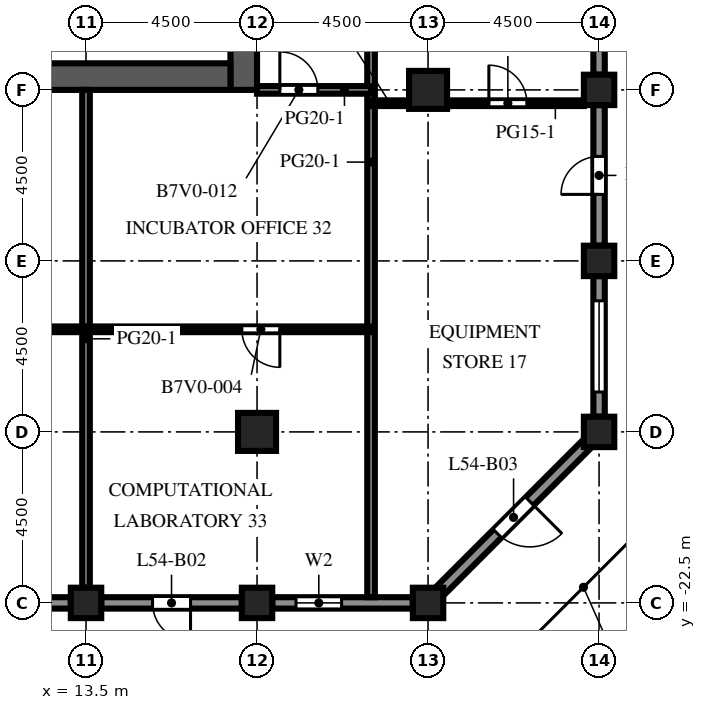
"""IFC4 building model, lengths in metres.
Left out: names, types, materials, properties, quantities, classifications, styles, units other than length and angle.
Written with IfcOpenShell. Run it as: python <this file> out.ifc"""

import sys

from ifc_helpers import new_model, si_unit, direction, frame, frame_2d, origin, origin_2d, place, context, subcontext, project, spatial, rectangle, extrude, element, fill, save


model = new_model("IFC4")
c1 = context("Model", 3, precision=1e-05, world=origin(), true_north=direction((0.0, 1.0)))
c2 = subcontext(c1, "Body", "Model", "MODEL_VIEW")
j1 = project(units=[si_unit("LENGTHUNIT", "METRE"), si_unit("PLANEANGLEUNIT", "RADIAN")], contexts=[c1])
p1 = place(None, origin())
s1 = spatial("IfcSite", under=j1, at=p1, CompositionType="ELEMENT")
p2 = place(p1, origin())
s2 = spatial("IfcBuilding", under=s1, at=p2, CompositionType="ELEMENT")
p3 = place(p2, frame((0.0, 0.0, 239.8)))
s3 = spatial("IfcBuildingStorey", under=s2, at=p3, CompositionType="ELEMENT", Elevation=239.8)
for number, where, z_axis, x_axis in (
    (1, (13.5, -22.5, 0.0), (0.0, 0.0, 1.0), (1.0, 0.0, 0.0)),
    (2, (18.0, -22.5, 0.0), (0.0, 0.0, 1.0), (1.0, 0.0, 0.0)),
    (3, (22.5, -22.5, 0.0), (0.0, 0.0, 1.0), (1.0, 0.0, 0.0)),
    (4, (27.0, -18.0, 0.0), (0.0, 0.0, 1.0), (1.0, 0.0, 0.0)),
    (5, (27.0, -13.5, 0.0), (0.0, 0.0, 1.0), (1.0, 0.0, 0.0)),
    (6, (27.0, -9.0, 0.0), (0.0, 0.0, 1.0), (1.0, 0.0, 0.0)),
):
    element("IfcColumn", number, at=place(p3, frame(where, z_axis=z_axis, x_axis=x_axis)), inside=s3, PredefinedType="COLUMN", context=c2, shape_type="SweptSolid", body=[
        extrude(rectangle(XDim=0.8, YDim=0.8, at=origin_2d()), origin(), (0.0, 0.0, 1.0), 4.1),
    ])
for number, where, z_axis, x_axis in (
    (7, (18.0, -18.0, 0.0), (0.0, 0.0, 1.0), (1.0, 0.0, 0.0)),
    (8, (22.5, -9.0, 0.0), (0.0, 0.0, 1.0), (1.0, 0.0, 0.0)),
):
    element("IfcColumn", number, at=place(p3, frame(where, z_axis=z_axis, x_axis=x_axis)), inside=s3, PredefinedType="COLUMN", context=c2, shape_type="SweptSolid", body=[
        extrude(rectangle(XDim=1.0, YDim=1.0, at=origin_2d()), origin(), (0.0, 0.0, 1.0), 4.1),
    ])
p4 = place(p3, frame((17.65, -9.0, 0.0), z_axis=(0.0, 0.0, 1.0), x_axis=(0.0, 1.0, 0.0)))
e9 = element("IfcWall", 9, at=p4, inside=s3, PredefinedType="SHEAR", context=c2, shape_type="SweptSolid", body=[
    extrude(rectangle(XDim=27.5, YDim=0.7, at=frame_2d((13.75, 0.0))), origin(), (0.0, 0.0, 1.0), 4.1),
])
p5 = place(p4, frame((12.55, 0.0, 0.0)))
e10 = element("IfcOpeningElement", 10, at=p5, cuts=e9, PredefinedType="OPENING", context=c2, shape_type="SweptSolid", body=[
    extrude(rectangle(XDim=2.4, YDim=2.4, at=frame_2d((1.2, 1.2))), frame((0.0, 0.36, 0.0), z_axis=(0.0, -1.0, 0.0), x_axis=(1.0, 0.0, 0.0)), (0.0, 0.0, 1.0), 0.72),
])
p6 = place(p4, frame((6.825, 0.0, 0.0)))
e11 = element("IfcOpeningElement", 11, at=p6, cuts=e9, PredefinedType="OPENING", context=c2, shape_type="SweptSolid", body=[
    extrude(rectangle(XDim=1.2, YDim=2.1, at=frame_2d((0.6, 1.05))), frame((0.0, 0.36, 0.0), z_axis=(0.0, -1.0, 0.0), x_axis=(1.0, 0.0, 0.0)), (0.0, 0.0, 1.0), 0.72),
])
p7 = place(p4, frame((19.475, 0.0, 0.0)))
e12 = element("IfcOpeningElement", 12, at=p7, cuts=e9, PredefinedType="OPENING", context=c2, shape_type="SweptSolid", body=[
    extrude(rectangle(XDim=1.2, YDim=2.1, at=frame_2d((0.6, 1.05))), frame((0.0, 0.36, 0.0), z_axis=(0.0, -1.0, 0.0), x_axis=(1.0, 0.0, 0.0)), (0.0, 0.0, 1.0), 0.72),
])
p8 = place(p3, frame((6.7, -8.65, 0.0), z_axis=(0.0, 0.0, 1.0), x_axis=(1.0, 0.0, 0.0)))
e13 = element("IfcWall", 13, at=p8, inside=s3, PredefinedType="SHEAR", context=c2, shape_type="SweptSolid", body=[
    extrude(rectangle(XDim=10.6, YDim=0.7, at=frame_2d((5.3, 0.0))), origin(), (0.0, 0.0, 1.0), 4.1),
])
p9 = place(p3, frame((13.1, -22.5, 0.0), z_axis=(0.0, 0.0, 1.0), x_axis=(-1.0, 0.0, 0.0)))
e14 = element("IfcWall", 14, at=p9, inside=s3, PredefinedType="SOLIDWALL", context=c2, shape_type="SweptSolid", body=[
    extrude(rectangle(XDim=3.7, YDim=0.3, at=frame_2d((1.85, 0.0))), origin(), (0.0, 0.0, 1.0), 2.85),
])
p10 = place(p9, frame((0.65, 0.0, 0.8)))
e15 = element("IfcOpeningElement", 15, at=p10, cuts=e14, PredefinedType="OPENING", context=c2, shape_type="SweptSolid", body=[
    extrude(rectangle(XDim=2.4, YDim=1.7, at=frame_2d((1.2, 0.85))), frame((0.0, 0.16, 0.0), z_axis=(0.0, -1.0, 0.0), x_axis=(1.0, 0.0, 0.0)), (0.0, 0.0, 1.0), 0.32),
])
p11 = place(p3, frame((17.6, -22.5, 0.0), z_axis=(0.0, 0.0, 1.0), x_axis=(-1.0, 0.0, 0.0)))
e16 = element("IfcWall", 16, at=p11, inside=s3, PredefinedType="SOLIDWALL", context=c2, shape_type="SweptSolid", body=[
    extrude(rectangle(XDim=3.7, YDim=0.3, at=frame_2d((1.85, 0.0))), origin(), (0.0, 0.0, 1.0), 2.85),
])
p12 = place(p11, frame((1.35, 0.0, 0.0)))
e17 = element("IfcOpeningElement", 17, at=p12, cuts=e16, PredefinedType="OPENING", context=c2, shape_type="SweptSolid", body=[
    extrude(rectangle(XDim=1.0, YDim=2.2, at=frame_2d((0.5, 1.1))), frame((0.0, 0.16, 0.0), z_axis=(0.0, -1.0, 0.0), x_axis=(1.0, 0.0, 0.0)), (0.0, 0.0, 1.0), 0.32),
])
p13 = place(p3, frame((22.1, -22.5, 0.0), z_axis=(0.0, 0.0, 1.0), x_axis=(-1.0, 0.0, 0.0)))
e18 = element("IfcWall", 18, at=p13, inside=s3, PredefinedType="SOLIDWALL", context=c2, shape_type="SweptSolid", body=[
    extrude(rectangle(XDim=3.7, YDim=0.3, at=frame_2d((1.85, 0.0))), origin(), (0.0, 0.0, 1.0), 2.85),
])
p14 = place(p13, frame((1.875, 0.0, 0.8)))
e19 = element("IfcOpeningElement", 19, at=p14, cuts=e18, PredefinedType="OPENING", context=c2, shape_type="SweptSolid", body=[
    extrude(rectangle(XDim=1.2, YDim=1.7, at=frame_2d((0.6, 0.85))), frame((0.0, 0.16, 0.0), z_axis=(0.0, -1.0, 0.0), x_axis=(1.0, 0.0, 0.0)), (0.0, 0.0, 1.0), 0.32),
])
p15 = place(p3, frame((26.706, -18.294, 0.0), z_axis=(0.0, 0.0, 1.0), x_axis=(-0.707106781187, -0.707106781187, 0.0)))
e20 = element("IfcWall", 20, at=p15, inside=s3, PredefinedType="SOLIDWALL", context=c2, shape_type="SweptSolid", body=[
    extrude(rectangle(XDim=5.532, YDim=0.3, at=frame_2d((2.766, 0.0))), origin(), (0.0, 0.0, 1.0), 2.85),
])
p16 = place(p15, frame((2.166, 0.0, 0.0)))
e21 = element("IfcOpeningElement", 21, at=p16, cuts=e20, PredefinedType="OPENING", context=c2, shape_type="SweptSolid", body=[
    extrude(rectangle(XDim=1.2, YDim=2.2, at=frame_2d((0.6, 1.1))), frame((0.0, 0.16, 0.0), z_axis=(0.0, -1.0, 0.0), x_axis=(1.0, 0.0, 0.0)), (0.0, 0.0, 1.0), 0.32),
])
p17 = place(p3, frame((27.0, -13.9, 0.0), z_axis=(0.0, 0.0, 1.0), x_axis=(0.0, -1.0, 0.0)))
e22 = element("IfcWall", 22, at=p17, inside=s3, PredefinedType="SOLIDWALL", context=c2, shape_type="SweptSolid", body=[
    extrude(rectangle(XDim=3.7, YDim=0.3, at=frame_2d((1.85, 0.0))), origin(), (0.0, 0.0, 1.0), 2.85),
])
p18 = place(p17, frame((0.65, 0.0, 0.8)))
e23 = element("IfcOpeningElement", 23, at=p18, cuts=e22, PredefinedType="OPENING", context=c2, shape_type="SweptSolid", body=[
    extrude(rectangle(XDim=2.4, YDim=1.7, at=frame_2d((1.2, 0.85))), frame((0.0, 0.16, 0.0), z_axis=(0.0, -1.0, 0.0), x_axis=(1.0, 0.0, 0.0)), (0.0, 0.0, 1.0), 0.32),
])
p19 = place(p3, frame((27.0, -9.4, 0.0), z_axis=(0.0, 0.0, 1.0), x_axis=(0.0, -1.0, 0.0)))
e24 = element("IfcWall", 24, at=p19, inside=s3, PredefinedType="SOLIDWALL", context=c2, shape_type="SweptSolid", body=[
    extrude(rectangle(XDim=3.7, YDim=0.3, at=frame_2d((1.85, 0.0))), origin(), (0.0, 0.0, 1.0), 2.85),
])
p20 = place(p19, frame((1.35, 0.0, 0.0)))
e25 = element("IfcOpeningElement", 25, at=p20, cuts=e24, PredefinedType="OPENING", context=c2, shape_type="SweptSolid", body=[
    extrude(rectangle(XDim=1.0, YDim=2.2, at=frame_2d((0.5, 1.1))), frame((0.0, 0.16, 0.0), z_axis=(0.0, -1.0, 0.0), x_axis=(1.0, 0.0, 0.0)), (0.0, 0.0, 1.0), 0.32),
])
p21 = place(p3, frame((27.0, -4.9, 0.0), z_axis=(0.0, 0.0, 1.0), x_axis=(0.0, -1.0, 0.0)))
e26 = element("IfcWall", 26, at=p21, inside=s3, PredefinedType="SOLIDWALL", context=c2, shape_type="SweptSolid", body=[
    extrude(rectangle(XDim=3.7, YDim=0.3, at=frame_2d((1.85, 0.0))), origin(), (0.0, 0.0, 1.0), 2.85),
])
p22 = place(p21, frame((0.65, 0.0, 0.8)))
e27 = element("IfcOpeningElement", 27, at=p22, cuts=e26, PredefinedType="OPENING", context=c2, shape_type="SweptSolid", body=[
    extrude(rectangle(XDim=2.4, YDim=1.7, at=frame_2d((1.2, 0.85))), frame((0.0, 0.16, 0.0), z_axis=(0.0, -1.0, 0.0), x_axis=(1.0, 0.0, 0.0)), (0.0, 0.0, 1.0), 0.32),
])
p23 = place(p3, frame((13.5, -22.1, 0.0), z_axis=(0.0, 0.0, 1.0), x_axis=(0.0, 1.0, 0.0)))
e28 = element("IfcWall", 28, at=p23, inside=s3, PredefinedType="PARTITIONING", context=c2, shape_type="SweptSolid", body=[
    extrude(rectangle(XDim=13.1, YDim=0.2, at=frame_2d((6.55, 0.0))), origin(), (0.0, 0.0, 1.0), 3.65),
])
p24 = place(p3, frame((21.0, 3.25, 0.0), z_axis=(0.0, 0.0, 1.0), x_axis=(0.0, -1.0, 0.0)))
e29 = element("IfcWall", 29, at=p24, inside=s3, PredefinedType="PARTITIONING", context=c2, shape_type="SweptSolid", body=[
    extrude(rectangle(XDim=25.6, YDim=0.2, at=frame_2d((12.8, 0.0))), origin(), (0.0, 0.0, 1.0), 3.65),
])
p25 = place(p24, frame((1.7, 0.0, 0.0)))
e30 = element("IfcOpeningElement", 30, at=p25, cuts=e29, PredefinedType="OPENING", context=c2, shape_type="SweptSolid", body=[
    extrude(rectangle(XDim=1.0, YDim=2.1, at=frame_2d((0.5, 1.05))), frame((0.0, 0.11, 0.0), z_axis=(0.0, -1.0, 0.0), x_axis=(1.0, 0.0, 0.0)), (0.0, 0.0, 1.0), 0.22),
])
p26 = place(p3, frame((21.0, -15.3, 0.0), z_axis=(0.0, 0.0, 1.0), x_axis=(-1.0, 0.0, 0.0)))
e31 = element("IfcWall", 31, at=p26, inside=s3, PredefinedType="PARTITIONING", context=c2, shape_type="SweptSolid", body=[
    extrude(rectangle(XDim=34.5, YDim=0.15, at=frame_2d((17.25, 0.0))), origin(), (0.0, 0.0, 1.0), 3.65),
])
p27 = place(p26, frame((32.4, 0.0, 0.0)))
e32 = element("IfcOpeningElement", 32, at=p27, cuts=e31, PredefinedType="OPENING", context=c2, shape_type="SweptSolid", body=[
    extrude(rectangle(XDim=1.0, YDim=2.1, at=frame_2d((0.5, 1.05))), frame((0.0, 0.085, 0.0), z_axis=(0.0, -1.0, 0.0), x_axis=(1.0, 0.0, 0.0)), (0.0, 0.0, 1.0), 0.17),
])
p28 = place(p26, frame((23.4, 0.0, 0.0)))
e33 = element("IfcOpeningElement", 33, at=p28, cuts=e31, PredefinedType="OPENING", context=c2, shape_type="SweptSolid", body=[
    extrude(rectangle(XDim=1.0, YDim=2.1, at=frame_2d((0.5, 1.05))), frame((0.0, 0.085, 0.0), z_axis=(0.0, -1.0, 0.0), x_axis=(1.0, 0.0, 0.0)), (0.0, 0.0, 1.0), 0.17),
])
p29 = place(p26, frame((11.4, 0.0, 0.0)))
e34 = element("IfcOpeningElement", 34, at=p29, cuts=e31, PredefinedType="OPENING", context=c2, shape_type="SweptSolid", body=[
    extrude(rectangle(XDim=1.0, YDim=2.1, at=frame_2d((0.5, 1.05))), frame((0.0, 0.085, 0.0), z_axis=(0.0, -1.0, 0.0), x_axis=(1.0, 0.0, 0.0)), (0.0, 0.0, 1.0), 0.17),
])
p30 = place(p26, frame((2.4, 0.0, 0.0)))
e35 = element("IfcOpeningElement", 35, at=p30, cuts=e31, PredefinedType="OPENING", context=c2, shape_type="SweptSolid", body=[
    extrude(rectangle(XDim=1.0, YDim=2.1, at=frame_2d((0.5, 1.05))), frame((0.0, 0.085, 0.0), z_axis=(0.0, -1.0, 0.0), x_axis=(1.0, 0.0, 0.0)), (0.0, 0.0, 1.0), 0.17),
])
p31 = place(p3, frame((21.0, -9.35, 0.0), z_axis=(0.0, 0.0, 1.0), x_axis=(1.0, 0.0, 0.0)))
e36 = element("IfcWall", 36, at=p31, inside=s3, PredefinedType="PARTITIONING", context=c2, shape_type="SweptSolid", body=[
    extrude(rectangle(XDim=1.0, YDim=0.15, at=frame_2d((0.5, 0.0))), origin(), (0.0, 0.0, 1.0), 3.65),
])
p32 = place(p3, frame((26.6, -9.35, 0.0), z_axis=(0.0, 0.0, 1.0), x_axis=(-1.0, 0.0, 0.0)))
e37 = element("IfcWall", 37, at=p32, inside=s3, PredefinedType="PARTITIONING", context=c2, shape_type="SweptSolid", body=[
    extrude(rectangle(XDim=3.6, YDim=0.15, at=frame_2d((1.8, 0.0))), origin(), (0.0, 0.0, 1.0), 3.65),
])
p33 = place(p32, frame((1.5, 0.0, 0.0)))
e38 = element("IfcOpeningElement", 38, at=p33, cuts=e37, PredefinedType="OPENING", context=c2, shape_type="SweptSolid", body=[
    extrude(rectangle(XDim=1.0, YDim=2.1, at=frame_2d((0.5, 1.05))), frame((0.0, 0.085, 0.0), z_axis=(0.0, -1.0, 0.0), x_axis=(1.0, 0.0, 0.0)), (0.0, 0.0, 1.0), 0.17),
])
p34 = place(p3, frame((21.0, -9.0, 0.0), z_axis=(0.0, 0.0, 1.0), x_axis=(-1.0, 0.0, 0.0)))
e39 = element("IfcWall", 39, at=p34, inside=s3, PredefinedType="PARTITIONING", context=c2, shape_type="SweptSolid", body=[
    extrude(rectangle(XDim=3.0, YDim=0.2, at=frame_2d((1.5, 0.0))), origin(), (0.0, 0.0, 1.0), 3.65),
])
p35 = place(p34, frame((1.4, 0.0, 0.0)))
e40 = element("IfcOpeningElement", 40, at=p35, cuts=e39, PredefinedType="OPENING", context=c2, shape_type="SweptSolid", body=[
    extrude(rectangle(XDim=1.0, YDim=2.1, at=frame_2d((0.5, 1.05))), frame((0.0, 0.11, 0.0), z_axis=(0.0, -1.0, 0.0), x_axis=(1.0, 0.0, 0.0)), (0.0, 0.0, 1.0), 0.22),
])
p36 = place(p12, origin())
e41 = element("IfcDoor", 41, at=p36, inside=s3, OperationType="SINGLE_SWING_LEFT", PredefinedType="DOOR", context=c2, shape_type="SweptSolid", body=[
    extrude(rectangle(XDim=1.0, YDim=2.2, at=frame_2d((0.5, 1.1))), frame((0.0, 0.025, 0.0), z_axis=(0.0, -1.0, 0.0), x_axis=(1.0, 0.0, 0.0)), (0.0, 0.0, 1.0), 0.05),
])
fill(e17, e41)
p37 = place(p14, origin())
e42 = element("IfcWindow", 42, at=p37, inside=s3, PartitioningType="SINGLE_PANEL", PredefinedType="WINDOW", context=c2, shape_type="SweptSolid", body=[
    extrude(rectangle(XDim=1.2, YDim=1.7, at=frame_2d((0.6, 0.85))), frame((0.0, 0.03, 0.0), z_axis=(0.0, -1.0, 0.0), x_axis=(1.0, 0.0, 0.0)), (0.0, 0.0, 1.0), 0.06),
])
fill(e19, e42)
p38 = place(p16, origin())
e43 = element("IfcDoor", 43, at=p38, inside=s3, OperationType="SINGLE_SWING_LEFT", PredefinedType="DOOR", context=c2, shape_type="SweptSolid", body=[
    extrude(rectangle(XDim=1.2, YDim=2.2, at=frame_2d((0.6, 1.1))), frame((0.0, 0.025, 0.0), z_axis=(0.0, -1.0, 0.0), x_axis=(1.0, 0.0, 0.0)), (0.0, 0.0, 1.0), 0.05),
])
fill(e21, e43)
p39 = place(p18, origin())
e44 = element("IfcWindow", 44, at=p39, inside=s3, PartitioningType="SINGLE_PANEL", PredefinedType="WINDOW", context=c2, shape_type="SweptSolid", body=[
    extrude(rectangle(XDim=2.4, YDim=1.7, at=frame_2d((1.2, 0.85))), frame((0.0, 0.03, 0.0), z_axis=(0.0, -1.0, 0.0), x_axis=(1.0, 0.0, 0.0)), (0.0, 0.0, 1.0), 0.06),
])
fill(e23, e44)
p40 = place(p20, origin())
e45 = element("IfcDoor", 45, at=p40, inside=s3, OperationType="SINGLE_SWING_RIGHT", PredefinedType="DOOR", context=c2, shape_type="SweptSolid", body=[
    extrude(rectangle(XDim=1.0, YDim=2.2, at=frame_2d((0.5, 1.1))), frame((0.0, 0.025, 0.0), z_axis=(0.0, -1.0, 0.0), x_axis=(1.0, 0.0, 0.0)), (0.0, 0.0, 1.0), 0.05),
])
fill(e25, e45)
p41 = place(p30, origin())
e46 = element("IfcDoor", 46, at=p41, inside=s3, OperationType="SINGLE_SWING_LEFT", PredefinedType="DOOR", context=c2, shape_type="SweptSolid", body=[
    extrude(rectangle(XDim=1.0, YDim=2.1, at=frame_2d((0.5, 1.05))), frame((0.0, 0.025, 0.0), z_axis=(0.0, -1.0, 0.0), x_axis=(1.0, 0.0, 0.0)), (0.0, 0.0, 1.0), 0.05),
])
fill(e35, e46)
p42 = place(p33, origin())
e47 = element("IfcDoor", 47, at=p42, inside=s3, OperationType="SINGLE_SWING_RIGHT", PredefinedType="DOOR", context=c2, shape_type="SweptSolid", body=[
    extrude(rectangle(XDim=1.0, YDim=2.1, at=frame_2d((0.5, 1.05))), frame((0.0, 0.025, 0.0), z_axis=(0.0, -1.0, 0.0), x_axis=(1.0, 0.0, 0.0)), (0.0, 0.0, 1.0), 0.05),
])
fill(e38, e47)
p43 = place(p35, origin())
e48 = element("IfcDoor", 48, at=p43, inside=s3, OperationType="SINGLE_SWING_RIGHT", PredefinedType="DOOR", context=c2, shape_type="SweptSolid", body=[
    extrude(rectangle(XDim=1.0, YDim=2.1, at=frame_2d((0.5, 1.05))), frame((0.0, 0.025, 0.0), z_axis=(0.0, -1.0, 0.0), x_axis=(1.0, 0.0, 0.0)), (0.0, 0.0, 1.0), 0.05),
])
fill(e40, e48)
save(model, sys.argv[1])
